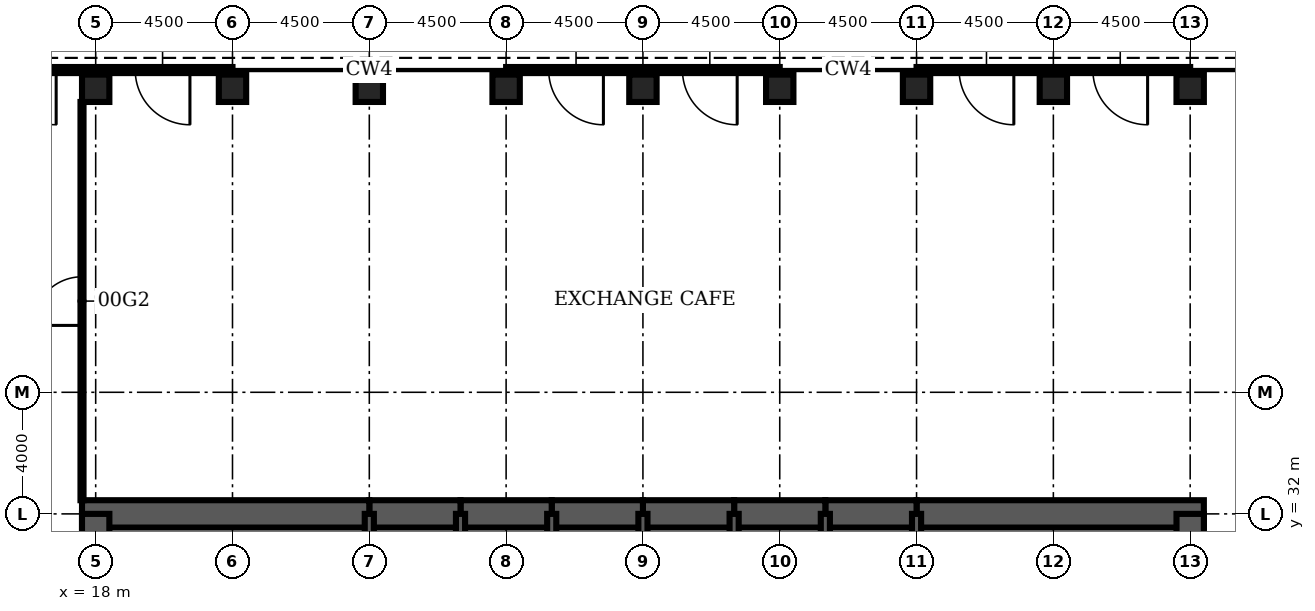
"""IFC4 building model, lengths in metres.
Left out: names, types, materials, properties, quantities, classifications, styles, units other than length and angle.
Written with IfcOpenShell. Run it as: python <this file> out.ifc"""

import sys

from ifc_helpers import new_model, si_unit, direction, frame, frame_2d, origin, origin_2d, place, context, subcontext, project, spatial, rectangle, hollow_rectangle, extrude, element, fill, save


model = new_model("IFC4")
c1 = context("Model", 3, precision=1e-05, world=origin(), true_north=direction((0.0, 1.0)))
c2 = subcontext(c1, "Body", "Model", "MODEL_VIEW")
j1 = project(units=[si_unit("LENGTHUNIT", "METRE"), si_unit("PLANEANGLEUNIT", "RADIAN")], contexts=[c1])
p1 = place(None, origin())
s1 = spatial("IfcSite", under=j1, at=p1, CompositionType="ELEMENT")
p2 = place(p1, origin())
s2 = spatial("IfcBuilding", under=s1, at=p2, CompositionType="ELEMENT")
p3 = place(p2, origin())
s3 = spatial("IfcBuildingStorey", under=s2, at=p3, CompositionType="ELEMENT", Elevation=0.0)
for number, where, z_axis, x_axis in (
    (1, (54.0, 46.0, 0.0), (0.0, 0.0, 1.0), (0.0, 1.0, 0.0)),
    (2, (49.5, 46.0, 0.0), (0.0, 0.0, 1.0), (0.0, 1.0, 0.0)),
    (3, (45.0, 46.0, 0.0), (0.0, 0.0, 1.0), (0.0, 1.0, 0.0)),
    (4, (40.5, 46.0, 0.0), (0.0, 0.0, 1.0), (0.0, 1.0, 0.0)),
    (5, (36.0, 46.0, 0.0), (0.0, 0.0, 1.0), (0.0, 1.0, 0.0)),
    (6, (31.5, 46.0, 0.0), (0.0, 0.0, 1.0), (0.0, 1.0, 0.0)),
    (7, (27.0, 46.0, 0.0), (0.0, 0.0, 1.0), (0.0, 1.0, 0.0)),
    (8, (22.5, 46.0, 0.0), (0.0, 0.0, 1.0), (0.0, 1.0, 0.0)),
    (9, (18.0, 46.0, 0.0), (0.0, 0.0, 1.0), (0.0, 1.0, 0.0)),
):
    element("IfcColumn", number, at=place(p3, frame(where, z_axis=z_axis, x_axis=x_axis)), inside=s3, PredefinedType="COLUMN", context=c2, shape_type="SweptSolid", body=[
        extrude(hollow_rectangle(XDim=0.9, YDim=0.9, WallThickness=0.12, at=origin_2d()), origin(), (0.0, 0.0, 1.0), 6.0),
    ])
p4 = place(p3, frame((54.45, 32.0, 0.0), z_axis=(0.0, 0.0, 1.0), x_axis=(-1.0, 0.0, 0.0)))
e10 = element("IfcWall", 10, at=p4, inside=s3, PredefinedType="SHEAR", context=c2, shape_type="SweptSolid", body=[
    extrude(rectangle(XDim=9.45, YDim=0.9, at=frame_2d((4.725, 0.0))), origin(), (0.0, 0.0, 1.0), 6.0),
])
for number, where, z_axis, x_axis in (
    (11, (45.0, 32.0, 0.0), (0.0, 0.0, 1.0), (-1.0, 0.0, 0.0)),
    (12, (42.0, 32.0, 0.0), (0.0, 0.0, 1.0), (-1.0, 0.0, 0.0)),
    (13, (39.0, 32.0, 0.0), (0.0, 0.0, 1.0), (-1.0, 0.0, 0.0)),
    (14, (36.0, 32.0, 0.0), (0.0, 0.0, 1.0), (-1.0, 0.0, 0.0)),
    (15, (33.0, 32.0, 0.0), (0.0, 0.0, 1.0), (-1.0, 0.0, 0.0)),
    (16, (30.0, 32.0, 0.0), (0.0, 0.0, 1.0), (-1.0, 0.0, 0.0)),
):
    element("IfcWall", number, at=place(p3, frame(where, z_axis=z_axis, x_axis=x_axis)), inside=s3, PredefinedType="SHEAR", context=c2, shape_type="SweptSolid", body=[
        extrude(rectangle(XDim=3.0, YDim=0.9, at=frame_2d((1.5, 0.0))), origin(), (0.0, 0.0, 1.0), 6.0),
    ])
p5 = place(p3, frame((27.0, 32.0, 0.0), z_axis=(0.0, 0.0, 1.0), x_axis=(-1.0, 0.0, 0.0)))
e17 = element("IfcWall", 17, at=p5, inside=s3, PredefinedType="SHEAR", context=c2, shape_type="SweptSolid", body=[
    extrude(rectangle(XDim=9.45, YDim=0.9, at=frame_2d((4.725, 0.0))), origin(), (0.0, 0.0, 1.0), 6.0),
])
for number, where, z_axis, x_axis in (
    (18, (18.0, 32.0, 0.0), (0.0, 0.0, 1.0), (0.0, -1.0, 0.0)),
    (19, (54.0, 28.8, 0.0), (0.0, 0.0, 1.0), (0.0, 1.0, 0.0)),
):
    element("IfcWall", number, at=place(p3, frame(where, z_axis=z_axis, x_axis=x_axis)), inside=s3, PredefinedType="SHEAR", context=c2, shape_type="SweptSolid", body=[
        extrude(rectangle(XDim=3.2, YDim=0.9, at=frame_2d((1.6, 0.0))), origin(), (0.0, 0.0, 1.0), 6.0),
    ])
for number, where, z_axis, x_axis in (
    (20, (27.0, 28.8, 0.0), (0.0, 0.0, 1.0), (0.0, 1.0, 0.0)),
    (21, (30.0, 28.8, 0.0), (0.0, 0.0, 1.0), (0.0, 1.0, 0.0)),
    (22, (33.0, 28.8, 0.0), (0.0, 0.0, 1.0), (0.0, 1.0, 0.0)),
    (23, (36.0, 28.8, 0.0), (0.0, 0.0, 1.0), (0.0, 1.0, 0.0)),
    (24, (39.0, 28.8, 0.0), (0.0, 0.0, 1.0), (0.0, 1.0, 0.0)),
    (25, (42.0, 28.8, 0.0), (0.0, 0.0, 1.0), (0.0, 1.0, 0.0)),
    (26, (45.0, 28.8, 0.0), (0.0, 0.0, 1.0), (0.0, 1.0, 0.0)),
):
    element("IfcWall", number, at=place(p3, frame(where, z_axis=z_axis, x_axis=x_axis)), inside=s3, PredefinedType="SOLIDWALL", context=c2, shape_type="SweptSolid", body=[
        extrude(rectangle(XDim=3.2, YDim=0.3, at=frame_2d((1.6, 0.0))), origin(), (0.0, 0.0, 1.0), 6.0),
    ])
p6 = place(p3, frame((17.55, 32.45, 0.0), z_axis=(0.0, 0.0, 1.0), x_axis=(0.0, 1.0, 0.0)))
e27 = element("IfcWall", 27, at=p6, inside=s3, PredefinedType="PARTITIONING", context=c2, shape_type="SweptSolid", body=[
    extrude(rectangle(XDim=13.1, YDim=0.1, at=frame_2d((6.55, 0.0))), origin(), (0.0, 0.0, 1.0), 3.0),
])
p7 = place(p6, frame((5.75, 0.0, 0.0)))
e28 = element("IfcOpeningElement", 28, at=p7, cuts=e27, PredefinedType="OPENING", context=c2, shape_type="SweptSolid", body=[
    extrude(rectangle(XDim=1.6, YDim=2.1, at=frame_2d((0.8, 1.05))), frame((0.0, 0.06, 0.0), z_axis=(0.0, -1.0, 0.0), x_axis=(1.0, 0.0, 0.0)), (0.0, 0.0, 1.0), 0.12),
])
p8 = place(p3, frame((54.0, 46.6, 0.0), z_axis=(0.0, 0.0, 1.0), x_axis=(-1.0, 0.0, 0.0)))
e29 = element("IfcWall", 29, at=p8, inside=s3, PredefinedType="USERDEFINED", context=c2, shape_type="SweptSolid", body=[
    extrude(rectangle(XDim=9.0, YDim=0.2, at=frame_2d((4.5, 0.0))), origin(), (0.0, 0.0, 1.0), 5.82),
])
p9 = place(p8, frame((1.4, 0.0, 0.0)))
e30 = element("IfcOpeningElement", 30, at=p9, cuts=e29, PredefinedType="OPENING", context=c2, shape_type="SweptSolid", body=[
    extrude(rectangle(XDim=1.8, YDim=2.4, at=frame_2d((0.9, 1.2))), frame((0.0, 0.11, 0.0), z_axis=(0.0, -1.0, 0.0), x_axis=(1.0, 0.0, 0.0)), (0.0, 0.0, 1.0), 0.22),
])
p10 = place(p8, frame((5.8, 0.0, 0.0)))
e31 = element("IfcOpeningElement", 31, at=p10, cuts=e29, PredefinedType="OPENING", context=c2, shape_type="SweptSolid", body=[
    extrude(rectangle(XDim=1.8, YDim=2.4, at=frame_2d((0.9, 1.2))), frame((0.0, 0.11, 0.0), z_axis=(0.0, -1.0, 0.0), x_axis=(1.0, 0.0, 0.0)), (0.0, 0.0, 1.0), 0.22),
])
p11 = place(p3, frame((40.5, 46.6, 0.0), z_axis=(0.0, 0.0, 1.0), x_axis=(-1.0, 0.0, 0.0)))
e32 = element("IfcWall", 32, at=p11, inside=s3, PredefinedType="USERDEFINED", context=c2, shape_type="SweptSolid", body=[
    extrude(rectangle(XDim=9.0, YDim=0.2, at=frame_2d((4.5, 0.0))), origin(), (0.0, 0.0, 1.0), 5.82),
])
p12 = place(p11, frame((1.4, 0.0, 0.0)))
e33 = element("IfcOpeningElement", 33, at=p12, cuts=e32, PredefinedType="OPENING", context=c2, shape_type="SweptSolid", body=[
    extrude(rectangle(XDim=1.8, YDim=2.4, at=frame_2d((0.9, 1.2))), frame((0.0, 0.11, 0.0), z_axis=(0.0, -1.0, 0.0), x_axis=(1.0, 0.0, 0.0)), (0.0, 0.0, 1.0), 0.22),
])
p13 = place(p11, frame((5.8, 0.0, 0.0)))
e34 = element("IfcOpeningElement", 34, at=p13, cuts=e32, PredefinedType="OPENING", context=c2, shape_type="SweptSolid", body=[
    extrude(rectangle(XDim=1.8, YDim=2.4, at=frame_2d((0.9, 1.2))), frame((0.0, 0.11, 0.0), z_axis=(0.0, -1.0, 0.0), x_axis=(1.0, 0.0, 0.0)), (0.0, 0.0, 1.0), 0.22),
])
p14 = place(p3, frame((22.5, 46.6, 0.0), z_axis=(0.0, 0.0, 1.0), x_axis=(-1.0, 0.0, 0.0)))
e35 = element("IfcWall", 35, at=p14, inside=s3, PredefinedType="USERDEFINED", context=c2, shape_type="SweptSolid", body=[
    extrude(rectangle(XDim=9.0, YDim=0.2, at=frame_2d((4.5, 0.0))), origin(), (0.0, 0.0, 1.0), 5.82),
])
p15 = place(p14, frame((1.4, 0.0, 0.0)))
e36 = element("IfcOpeningElement", 36, at=p15, cuts=e35, PredefinedType="OPENING", context=c2, shape_type="SweptSolid", body=[
    extrude(rectangle(XDim=1.8, YDim=2.4, at=frame_2d((0.9, 1.2))), frame((0.0, 0.11, 0.0), z_axis=(0.0, -1.0, 0.0), x_axis=(1.0, 0.0, 0.0)), (0.0, 0.0, 1.0), 0.22),
])
p16 = place(p14, frame((5.8, 0.0, 0.0)))
e37 = element("IfcOpeningElement", 37, at=p16, cuts=e35, PredefinedType="OPENING", context=c2, shape_type="SweptSolid", body=[
    extrude(rectangle(XDim=1.8, YDim=2.4, at=frame_2d((0.9, 1.2))), frame((0.0, 0.11, 0.0), z_axis=(0.0, -1.0, 0.0), x_axis=(1.0, 0.0, 0.0)), (0.0, 0.0, 1.0), 0.22),
])
p17 = place(p7, origin())
e38 = element("IfcDoor", 38, at=p17, inside=s3, OperationType="SINGLE_SWING_LEFT", PredefinedType="DOOR", context=c2, shape_type="SweptSolid", body=[
    extrude(rectangle(XDim=1.6, YDim=2.1, at=frame_2d((0.8, 1.05))), frame((0.0, 0.025, 0.0), z_axis=(0.0, -1.0, 0.0), x_axis=(1.0, 0.0, 0.0)), (0.0, 0.0, 1.0), 0.05),
])
fill(e28, e38)
p18 = place(p9, origin())
e39 = element("IfcDoor", 39, at=p18, inside=s3, OperationType="SINGLE_SWING_LEFT", PredefinedType="DOOR", context=c2, shape_type="SweptSolid", body=[
    extrude(rectangle(XDim=1.8, YDim=2.4, at=frame_2d((0.9, 1.2))), frame((0.0, 0.025, 0.0), z_axis=(0.0, -1.0, 0.0), x_axis=(1.0, 0.0, 0.0)), (0.0, 0.0, 1.0), 0.05),
])
fill(e30, e39)
p19 = place(p10, origin())
e40 = element("IfcDoor", 40, at=p19, inside=s3, OperationType="SINGLE_SWING_LEFT", PredefinedType="DOOR", context=c2, shape_type="SweptSolid", body=[
    extrude(rectangle(XDim=1.8, YDim=2.4, at=frame_2d((0.9, 1.2))), frame((0.0, 0.025, 0.0), z_axis=(0.0, -1.0, 0.0), x_axis=(1.0, 0.0, 0.0)), (0.0, 0.0, 1.0), 0.05),
])
fill(e31, e40)
p20 = place(p12, origin())
e41 = element("IfcDoor", 41, at=p20, inside=s3, OperationType="SINGLE_SWING_LEFT", PredefinedType="DOOR", context=c2, shape_type="SweptSolid", body=[
    extrude(rectangle(XDim=1.8, YDim=2.4, at=frame_2d((0.9, 1.2))), frame((0.0, 0.025, 0.0), z_axis=(0.0, -1.0, 0.0), x_axis=(1.0, 0.0, 0.0)), (0.0, 0.0, 1.0), 0.05),
])
fill(e33, e41)
p21 = place(p13, origin())
e42 = element("IfcDoor", 42, at=p21, inside=s3, OperationType="SINGLE_SWING_LEFT", PredefinedType="DOOR", context=c2, shape_type="SweptSolid", body=[
    extrude(rectangle(XDim=1.8, YDim=2.4, at=frame_2d((0.9, 1.2))), frame((0.0, 0.025, 0.0), z_axis=(0.0, -1.0, 0.0), x_axis=(1.0, 0.0, 0.0)), (0.0, 0.0, 1.0), 0.05),
])
fill(e34, e42)
p22 = place(p15, origin())
e43 = element("IfcDoor", 43, at=p22, inside=s3, OperationType="SINGLE_SWING_LEFT", PredefinedType="DOOR", context=c2, shape_type="SweptSolid", body=[
    extrude(rectangle(XDim=1.8, YDim=2.4, at=frame_2d((0.9, 1.2))), frame((0.0, 0.025, 0.0), z_axis=(0.0, -1.0, 0.0), x_axis=(1.0, 0.0, 0.0)), (0.0, 0.0, 1.0), 0.05),
])
fill(e36, e43)
p23 = place(p16, origin())
e44 = element("IfcDoor", 44, at=p23, inside=s3, OperationType="SINGLE_SWING_LEFT", PredefinedType="DOOR", context=c2, shape_type="SweptSolid", body=[
    extrude(rectangle(XDim=1.8, YDim=2.4, at=frame_2d((0.9, 1.2))), frame((0.0, 0.025, 0.0), z_axis=(0.0, -1.0, 0.0), x_axis=(1.0, 0.0, 0.0)), (0.0, 0.0, 1.0), 0.05),
])
fill(e37, e44)
save(model, sys.argv[1])
